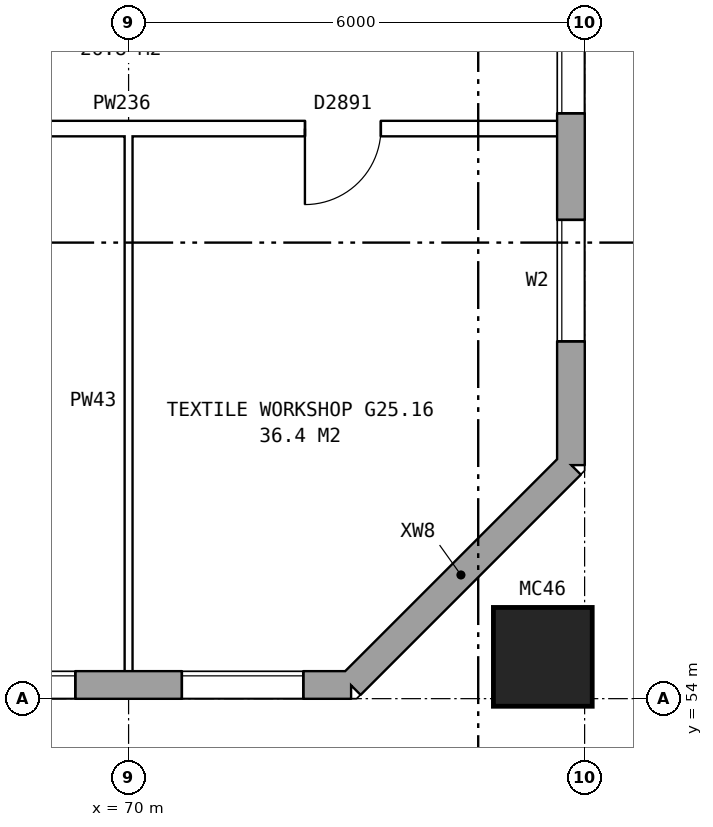
"""IFC4 building model, lengths in metres.
Left out: names, types, materials, properties, quantities, classifications, styles, units other than length and angle.
Written with IfcOpenShell. Run it as: python <this file> out.ifc"""

import sys

from ifc_helpers import new_model, si_unit, direction, frame, frame_2d, origin, origin_2d, place, context, subcontext, project, spatial, rectangle, hollow_rectangle, extrude, element, fill, save


model = new_model("IFC4")
c1 = context("Model", 3, precision=1e-05, world=origin(), true_north=direction((0.0, 1.0)))
c2 = subcontext(c1, "Body", "Model", "MODEL_VIEW")
j1 = project(units=[si_unit("LENGTHUNIT", "METRE"), si_unit("PLANEANGLEUNIT", "RADIAN")], contexts=[c1])
p1 = place(None, origin())
s1 = spatial("IfcSite", under=j1, at=p1, CompositionType="ELEMENT")
p2 = place(p1, origin())
s2 = spatial("IfcBuilding", under=s1, at=p2, CompositionType="ELEMENT")
p3 = place(p2, frame((0.0, 0.0, 90.2)))
s3 = spatial("IfcBuildingStorey", under=s2, at=p3, CompositionType="ELEMENT", Elevation=90.2)
p4 = place(p3, frame((75.45, 54.55, 0.0), z_axis=(0.0, 0.0, 1.0), x_axis=(1.0, 0.0, 0.0)))
e1 = element("IfcColumn", 1, at=p4, inside=s3, PredefinedType="COLUMN", context=c2, shape_type="SweptSolid", body=[
    extrude(hollow_rectangle(XDim=1.3, YDim=1.3, WallThickness=0.07, at=origin_2d()), origin(), (0.0, 0.0, 1.0), 6.2),
])
p5 = place(p3, frame((28.075, 54.18, 0.0), z_axis=(0.0, 0.0, 1.0), x_axis=(1.0, 0.0, 0.0)))
e2 = element("IfcWall", 2, at=p5, inside=s3, PredefinedType="STANDARD", context=c2, shape_type="SweptSolid", body=[
    extrude(rectangle(XDim=44.851, YDim=0.36, at=frame_2d((22.425, 0.0))), origin(), (0.0, 0.0, 1.0), 5.6),
])
p6 = place(p5, frame((0.625, 0.0, 0.15)))
e3 = element("IfcOpeningElement", 3, at=p6, cuts=e2, PredefinedType="OPENING", context=c2, shape_type="SweptSolid", body=[
    extrude(rectangle(XDim=1.6, YDim=2.4, at=frame_2d((0.8, 1.2))), frame((0.0, 0.19, 0.0), z_axis=(0.0, -1.0, 0.0), x_axis=(1.0, 0.0, 0.0)), (0.0, 0.0, 1.0), 0.38),
])
p7 = place(p5, frame((3.625, 0.0, 0.15)))
e4 = element("IfcOpeningElement", 4, at=p7, cuts=e2, PredefinedType="OPENING", context=c2, shape_type="SweptSolid", body=[
    extrude(rectangle(XDim=1.6, YDim=2.4, at=frame_2d((0.8, 1.2))), frame((0.0, 0.19, 0.0), z_axis=(0.0, -1.0, 0.0), x_axis=(1.0, 0.0, 0.0)), (0.0, 0.0, 1.0), 0.38),
])
p8 = place(p5, frame((6.625, 0.0, 0.15)))
e5 = element("IfcOpeningElement", 5, at=p8, cuts=e2, PredefinedType="OPENING", context=c2, shape_type="SweptSolid", body=[
    extrude(rectangle(XDim=1.6, YDim=2.4, at=frame_2d((0.8, 1.2))), frame((0.0, 0.19, 0.0), z_axis=(0.0, -1.0, 0.0), x_axis=(1.0, 0.0, 0.0)), (0.0, 0.0, 1.0), 0.38),
])
p9 = place(p5, frame((9.625, 0.0, 0.15)))
e6 = element("IfcOpeningElement", 6, at=p9, cuts=e2, PredefinedType="OPENING", context=c2, shape_type="SweptSolid", body=[
    extrude(rectangle(XDim=1.6, YDim=2.4, at=frame_2d((0.8, 1.2))), frame((0.0, 0.19, 0.0), z_axis=(0.0, -1.0, 0.0), x_axis=(1.0, 0.0, 0.0)), (0.0, 0.0, 1.0), 0.38),
])
p10 = place(p5, frame((12.625, 0.0, 0.15)))
e7 = element("IfcOpeningElement", 7, at=p10, cuts=e2, PredefinedType="OPENING", context=c2, shape_type="SweptSolid", body=[
    extrude(rectangle(XDim=1.6, YDim=2.4, at=frame_2d((0.8, 1.2))), frame((0.0, 0.19, 0.0), z_axis=(0.0, -1.0, 0.0), x_axis=(1.0, 0.0, 0.0)), (0.0, 0.0, 1.0), 0.38),
])
p11 = place(p5, frame((15.625, 0.0, 0.15)))
e8 = element("IfcOpeningElement", 8, at=p11, cuts=e2, PredefinedType="OPENING", context=c2, shape_type="SweptSolid", body=[
    extrude(rectangle(XDim=1.6, YDim=2.4, at=frame_2d((0.8, 1.2))), frame((0.0, 0.19, 0.0), z_axis=(0.0, -1.0, 0.0), x_axis=(1.0, 0.0, 0.0)), (0.0, 0.0, 1.0), 0.38),
])
p12 = place(p5, frame((18.625, 0.0, 0.15)))
e9 = element("IfcOpeningElement", 9, at=p12, cuts=e2, PredefinedType="OPENING", context=c2, shape_type="SweptSolid", body=[
    extrude(rectangle(XDim=1.6, YDim=2.4, at=frame_2d((0.8, 1.2))), frame((0.0, 0.19, 0.0), z_axis=(0.0, -1.0, 0.0), x_axis=(1.0, 0.0, 0.0)), (0.0, 0.0, 1.0), 0.38),
])
p13 = place(p5, frame((21.625, 0.0, 0.15)))
e10 = element("IfcOpeningElement", 10, at=p13, cuts=e2, PredefinedType="OPENING", context=c2, shape_type="SweptSolid", body=[
    extrude(rectangle(XDim=1.6, YDim=2.4, at=frame_2d((0.8, 1.2))), frame((0.0, 0.19, 0.0), z_axis=(0.0, -1.0, 0.0), x_axis=(1.0, 0.0, 0.0)), (0.0, 0.0, 1.0), 0.38),
])
p14 = place(p5, frame((24.625, 0.0, 0.15)))
e11 = element("IfcOpeningElement", 11, at=p14, cuts=e2, PredefinedType="OPENING", context=c2, shape_type="SweptSolid", body=[
    extrude(rectangle(XDim=1.6, YDim=2.4, at=frame_2d((0.8, 1.2))), frame((0.0, 0.19, 0.0), z_axis=(0.0, -1.0, 0.0), x_axis=(1.0, 0.0, 0.0)), (0.0, 0.0, 1.0), 0.38),
])
p15 = place(p5, frame((27.625, 0.0, 0.15)))
e12 = element("IfcOpeningElement", 12, at=p15, cuts=e2, PredefinedType="OPENING", context=c2, shape_type="SweptSolid", body=[
    extrude(rectangle(XDim=1.6, YDim=2.4, at=frame_2d((0.8, 1.2))), frame((0.0, 0.19, 0.0), z_axis=(0.0, -1.0, 0.0), x_axis=(1.0, 0.0, 0.0)), (0.0, 0.0, 1.0), 0.38),
])
p16 = place(p5, frame((30.625, 0.0, 0.15)))
e13 = element("IfcOpeningElement", 13, at=p16, cuts=e2, PredefinedType="OPENING", context=c2, shape_type="SweptSolid", body=[
    extrude(rectangle(XDim=1.6, YDim=2.4, at=frame_2d((0.8, 1.2))), frame((0.0, 0.19, 0.0), z_axis=(0.0, -1.0, 0.0), x_axis=(1.0, 0.0, 0.0)), (0.0, 0.0, 1.0), 0.38),
])
p17 = place(p5, frame((33.625, 0.0, 0.15)))
e14 = element("IfcOpeningElement", 14, at=p17, cuts=e2, PredefinedType="OPENING", context=c2, shape_type="SweptSolid", body=[
    extrude(rectangle(XDim=1.6, YDim=2.4, at=frame_2d((0.8, 1.2))), frame((0.0, 0.19, 0.0), z_axis=(0.0, -1.0, 0.0), x_axis=(1.0, 0.0, 0.0)), (0.0, 0.0, 1.0), 0.38),
])
p18 = place(p5, frame((36.625, 0.0, 0.15)))
e15 = element("IfcOpeningElement", 15, at=p18, cuts=e2, PredefinedType="OPENING", context=c2, shape_type="SweptSolid", body=[
    extrude(rectangle(XDim=1.6, YDim=2.4, at=frame_2d((0.8, 1.2))), frame((0.0, 0.19, 0.0), z_axis=(0.0, -1.0, 0.0), x_axis=(1.0, 0.0, 0.0)), (0.0, 0.0, 1.0), 0.38),
])
p19 = place(p5, frame((39.625, 0.0, 0.15)))
e16 = element("IfcOpeningElement", 16, at=p19, cuts=e2, PredefinedType="OPENING", context=c2, shape_type="SweptSolid", body=[
    extrude(rectangle(XDim=1.6, YDim=2.4, at=frame_2d((0.8, 1.2))), frame((0.0, 0.19, 0.0), z_axis=(0.0, -1.0, 0.0), x_axis=(1.0, 0.0, 0.0)), (0.0, 0.0, 1.0), 0.38),
])
p20 = place(p5, frame((42.625, 0.0, 0.15)))
e17 = element("IfcOpeningElement", 17, at=p20, cuts=e2, PredefinedType="OPENING", context=c2, shape_type="SweptSolid", body=[
    extrude(rectangle(XDim=1.6, YDim=2.4, at=frame_2d((0.8, 1.2))), frame((0.0, 0.19, 0.0), z_axis=(0.0, -1.0, 0.0), x_axis=(1.0, 0.0, 0.0)), (0.0, 0.0, 1.0), 0.38),
])
p21 = place(p3, frame((72.925, 54.18, 0.0), z_axis=(0.0, 0.0, 1.0), x_axis=(0.707106781187, 0.707106781187, 0.0)))
e18 = element("IfcWall", 18, at=p21, inside=s3, PredefinedType="STANDARD", context=c2, shape_type="SweptSolid", body=[
    extrude(rectangle(XDim=4.094, YDim=0.36, at=frame_2d((2.047, 0.0))), origin(), (0.0, 0.0, 1.0), 5.6),
])
p22 = place(p3, frame((75.82, 57.075, 0.0), z_axis=(0.0, 0.0, 1.0), x_axis=(0.0, 1.0, 0.0)))
e19 = element("IfcWall", 19, at=p22, inside=s3, PredefinedType="STANDARD", context=c2, shape_type="SweptSolid", body=[
    extrude(rectangle(XDim=25.851, YDim=0.36, at=frame_2d((12.925, 0.0))), origin(), (0.0, 0.0, 1.0), 5.6),
])
p23 = place(p22, frame((1.625, 0.0, 0.15)))
e20 = element("IfcOpeningElement", 20, at=p23, cuts=e19, PredefinedType="OPENING", context=c2, shape_type="SweptSolid", body=[
    extrude(rectangle(XDim=1.6, YDim=2.4, at=frame_2d((0.8, 1.2))), frame((0.0, 0.19, 0.0), z_axis=(0.0, -1.0, 0.0), x_axis=(1.0, 0.0, 0.0)), (0.0, 0.0, 1.0), 0.38),
])
p24 = place(p22, frame((4.625, 0.0, 0.15)))
e21 = element("IfcOpeningElement", 21, at=p24, cuts=e19, PredefinedType="OPENING", context=c2, shape_type="SweptSolid", body=[
    extrude(rectangle(XDim=1.6, YDim=2.4, at=frame_2d((0.8, 1.2))), frame((0.0, 0.19, 0.0), z_axis=(0.0, -1.0, 0.0), x_axis=(1.0, 0.0, 0.0)), (0.0, 0.0, 1.0), 0.38),
])
p25 = place(p22, frame((19.625, 0.0, 0.15)))
e22 = element("IfcOpeningElement", 22, at=p25, cuts=e19, PredefinedType="OPENING", context=c2, shape_type="SweptSolid", body=[
    extrude(rectangle(XDim=1.6, YDim=2.4, at=frame_2d((0.8, 1.2))), frame((0.0, 0.19, 0.0), z_axis=(0.0, -1.0, 0.0), x_axis=(1.0, 0.0, 0.0)), (0.0, 0.0, 1.0), 0.38),
])
p26 = place(p22, frame((22.625, 0.0, 0.15)))
e23 = element("IfcOpeningElement", 23, at=p26, cuts=e19, PredefinedType="OPENING", context=c2, shape_type="SweptSolid", body=[
    extrude(rectangle(XDim=1.6, YDim=2.4, at=frame_2d((0.8, 1.2))), frame((0.0, 0.19, 0.0), z_axis=(0.0, -1.0, 0.0), x_axis=(1.0, 0.0, 0.0)), (0.0, 0.0, 1.0), 0.38),
])
p27 = place(p3, frame((63.9, 61.5, 0.0), z_axis=(0.0, 0.0, 1.0), x_axis=(1.0, 0.0, 0.0)))
e24 = element("IfcWall", 24, at=p27, inside=s3, PredefinedType="PARTITIONING", context=c2, shape_type="SweptSolid", body=[
    extrude(rectangle(XDim=11.86, YDim=0.2, at=frame_2d((5.93, 0.0))), origin(), (0.0, 0.0, 1.0), 5.6),
])
p28 = place(p27, frame((2.6, 0.0, 0.0)))
e25 = element("IfcOpeningElement", 25, at=p28, cuts=e24, PredefinedType="OPENING", context=c2, shape_type="SweptSolid", body=[
    extrude(rectangle(XDim=1.0, YDim=2.1, at=frame_2d((0.5, 1.05))), frame((0.0, 0.11, 0.0), z_axis=(0.0, -1.0, 0.0), x_axis=(1.0, 0.0, 0.0)), (0.0, 0.0, 1.0), 0.22),
])
p29 = place(p27, frame((8.42, 0.0, 0.0)))
e26 = element("IfcOpeningElement", 26, at=p29, cuts=e24, PredefinedType="OPENING", context=c2, shape_type="SweptSolid", body=[
    extrude(rectangle(XDim=1.0, YDim=2.1, at=frame_2d((0.5, 1.05))), frame((0.0, 0.11, 0.0), z_axis=(0.0, -1.0, 0.0), x_axis=(1.0, 0.0, 0.0)), (0.0, 0.0, 1.0), 0.22),
])
p30 = place(p3, frame((70.0, 54.24, 0.0), z_axis=(0.0, 0.0, 1.0), x_axis=(0.0, 1.0, 0.0)))
e27 = element("IfcWall", 27, at=p30, inside=s3, PredefinedType="PARTITIONING", context=c2, shape_type="SweptSolid", body=[
    extrude(rectangle(XDim=7.36, YDim=0.1, at=frame_2d((3.68, 0.0))), origin(), (0.0, 0.0, 1.0), 5.6),
])
p31 = place(p19, origin())
e28 = element("IfcWindow", 28, at=p31, inside=s3, PartitioningType="SINGLE_PANEL", PredefinedType="WINDOW", context=c2, shape_type="SweptSolid", body=[
    extrude(rectangle(XDim=1.6, YDim=2.4, at=frame_2d((0.8, 1.2))), frame((0.0, 0.15, 0.0), z_axis=(0.0, -1.0, 0.0), x_axis=(1.0, 0.0, 0.0)), (0.0, 0.0, 1.0), 0.06),
])
fill(e16, e28)
p32 = place(p20, origin())
e29 = element("IfcWindow", 29, at=p32, inside=s3, PartitioningType="SINGLE_PANEL", PredefinedType="WINDOW", context=c2, shape_type="SweptSolid", body=[
    extrude(rectangle(XDim=1.6, YDim=2.4, at=frame_2d((0.8, 1.2))), frame((0.0, 0.15, 0.0), z_axis=(0.0, -1.0, 0.0), x_axis=(1.0, 0.0, 0.0)), (0.0, 0.0, 1.0), 0.06),
])
fill(e17, e29)
p33 = place(p23, origin())
e30 = element("IfcWindow", 30, at=p33, inside=s3, PartitioningType="SINGLE_PANEL", PredefinedType="WINDOW", context=c2, shape_type="SweptSolid", body=[
    extrude(rectangle(XDim=1.6, YDim=2.4, at=frame_2d((0.8, 1.2))), frame((0.0, 0.15, 0.0), z_axis=(0.0, -1.0, 0.0), x_axis=(1.0, 0.0, 0.0)), (0.0, 0.0, 1.0), 0.06),
])
fill(e20, e30)
p34 = place(p24, origin())
e31 = element("IfcWindow", 31, at=p34, inside=s3, PartitioningType="SINGLE_PANEL", PredefinedType="WINDOW", context=c2, shape_type="SweptSolid", body=[
    extrude(rectangle(XDim=1.6, YDim=2.4, at=frame_2d((0.8, 1.2))), frame((0.0, 0.15, 0.0), z_axis=(0.0, -1.0, 0.0), x_axis=(1.0, 0.0, 0.0)), (0.0, 0.0, 1.0), 0.06),
])
fill(e21, e31)
p35 = place(p29, frame((1.0, 0.0, 0.0), z_axis=(0.0, 0.0, 1.0), x_axis=(-1.0, 0.0, 0.0)))
e32 = element("IfcDoor", 32, at=p35, inside=s3, OperationType="SINGLE_SWING_RIGHT", PredefinedType="DOOR", context=c2, shape_type="SweptSolid", body=[
    extrude(rectangle(XDim=1.0, YDim=2.1, at=frame_2d((0.5, 1.05))), frame((0.0, 0.025, 0.0), z_axis=(0.0, -1.0, 0.0), x_axis=(1.0, 0.0, 0.0)), (0.0, 0.0, 1.0), 0.05),
])
fill(e26, e32)
save(model, sys.argv[1])
